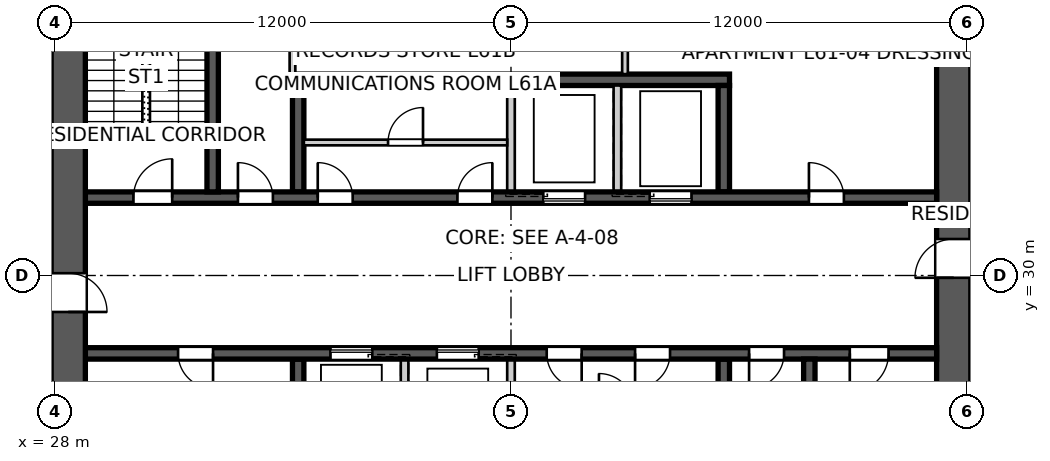
"""IFC4 building model, lengths in metres.
Left out: names, types, materials, properties, quantities, classifications, styles, units other than length and angle.
Written with IfcOpenShell. Run it as: python <this file> out.ifc"""

import sys

from ifc_helpers import new_model, si_unit, direction, frame, frame_2d, origin, place, context, subcontext, project, spatial, polyline, rectangle, outline, extrude, element, fill, save


model = new_model("IFC4")
c1 = context("Model", 3, precision=1e-05, world=origin(), true_north=direction((0.0, 1.0)))
c2 = subcontext(c1, "Body", "Model", "MODEL_VIEW")
j1 = project(units=[si_unit("LENGTHUNIT", "METRE"), si_unit("PLANEANGLEUNIT", "RADIAN")], contexts=[c1])
p1 = place(None, origin())
s1 = spatial("IfcSite", under=j1, at=p1, CompositionType="ELEMENT")
p2 = place(p1, origin())
s2 = spatial("IfcBuilding", under=s1, at=p2, CompositionType="ELEMENT")
p3 = place(p2, frame((0.0, 0.0, 221.8)))
s3 = spatial("IfcBuildingStorey", under=s2, at=p3, CompositionType="ELEMENT", Elevation=221.8)
p4 = place(p3, frame((51.65, 18.8, 0.0), z_axis=(0.0, 0.0, 1.0), x_axis=(0.0, 1.0, 0.0)))
e1 = element("IfcWall", 1, at=p4, inside=s3, PredefinedType="SHEAR", context=c2, shape_type="SweptSolid", body=[
    extrude(outline(polyline([(0.0, -0.45), (22.4, -0.45), (22.4, -0.025), (22.85, -0.025), (22.85, 0.025), (22.4, 0.025), (22.4, 0.45), (0.0, 0.45), (0.0, 0.025), (-0.45, 0.025), (-0.45, -0.025), (0.0, -0.025), (0.0, -0.45)])), origin(), (0.0, 0.0, 1.0), 3.4),
])
p5 = place(p4, frame((11.14, 0.0, 0.0)))
e2 = element("IfcOpeningElement", 2, at=p5, cuts=e1, PredefinedType="OPENING", context=c2, shape_type="SweptSolid", body=[
    extrude(rectangle(XDim=1.02, YDim=2.4, at=frame_2d((0.51, 1.2))), frame((0.0, 0.46, 0.0), z_axis=(0.0, -1.0, 0.0), x_axis=(1.0, 0.0, 0.0)), (0.0, 0.0, 1.0), 0.92),
])
p6 = place(p3, frame((28.35, 41.2, 0.0), z_axis=(0.0, 0.0, 1.0), x_axis=(0.0, -1.0, 0.0)))
e3 = element("IfcWall", 3, at=p6, inside=s3, PredefinedType="SHEAR", context=c2, shape_type="SweptSolid", body=[
    extrude(outline(polyline([(0.0, -0.45), (22.4, -0.45), (22.4, -0.025), (22.85, -0.025), (22.85, 0.025), (22.4, 0.025), (22.4, 0.45), (0.0, 0.45), (0.0, 0.025), (-0.45, 0.025), (-0.45, -0.025), (0.0, -0.025), (0.0, -0.45)])), origin(), (0.0, 0.0, 1.0), 3.4),
])
p7 = place(p6, frame((11.14, 0.0, 0.0)))
e4 = element("IfcOpeningElement", 4, at=p7, cuts=e3, PredefinedType="OPENING", context=c2, shape_type="SweptSolid", body=[
    extrude(rectangle(XDim=1.02, YDim=2.4, at=frame_2d((0.51, 1.2))), frame((0.0, 0.46, 0.0), z_axis=(0.0, -1.0, 0.0), x_axis=(1.0, 0.0, 0.0)), (0.0, 0.0, 1.0), 0.92),
])
p8 = place(p3, frame((28.8, 32.05, 0.0), z_axis=(0.0, 0.0, 1.0), x_axis=(1.0, 0.0, 0.0)))
e5 = element("IfcWall", 5, at=p8, inside=s3, PredefinedType="SHEAR", context=c2, shape_type="SweptSolid", body=[
    extrude(rectangle(XDim=22.4, YDim=0.3, at=frame_2d((11.2, 0.0))), origin(), (0.0, 0.0, 1.0), 3.4),
])
p9 = place(p8, frame((19.04, 0.0, 0.0)))
e6 = element("IfcOpeningElement", 6, at=p9, cuts=e5, PredefinedType="OPENING", context=c2, shape_type="SweptSolid", body=[
    extrude(rectangle(XDim=0.92, YDim=2.1, at=frame_2d((0.46, 1.05))), frame((0.0, 0.16, 0.0), z_axis=(0.0, -1.0, 0.0), x_axis=(1.0, 0.0, 0.0)), (0.0, 0.0, 1.0), 0.32),
])
p10 = place(p8, frame((1.265, 0.0, 0.0)))
e7 = element("IfcOpeningElement", 7, at=p10, cuts=e5, PredefinedType="OPENING", context=c2, shape_type="SweptSolid", body=[
    extrude(rectangle(XDim=1.02, YDim=2.1, at=frame_2d((0.51, 1.05))), frame((0.0, 0.16, 0.0), z_axis=(0.0, -1.0, 0.0), x_axis=(1.0, 0.0, 0.0)), (0.0, 0.0, 1.0), 0.32),
])
p11 = place(p8, frame((4.015, 0.0, 0.0)))
e8 = element("IfcOpeningElement", 8, at=p11, cuts=e5, PredefinedType="OPENING", context=c2, shape_type="SweptSolid", body=[
    extrude(rectangle(XDim=0.92, YDim=2.1, at=frame_2d((0.46, 1.05))), frame((0.0, 0.16, 0.0), z_axis=(0.0, -1.0, 0.0), x_axis=(1.0, 0.0, 0.0)), (0.0, 0.0, 1.0), 0.32),
])
p12 = place(p8, frame((6.115, 0.0, 0.0)))
e9 = element("IfcOpeningElement", 9, at=p12, cuts=e5, PredefinedType="OPENING", context=c2, shape_type="SweptSolid", body=[
    extrude(rectangle(XDim=0.92, YDim=2.1, at=frame_2d((0.46, 1.05))), frame((0.0, 0.16, 0.0), z_axis=(0.0, -1.0, 0.0), x_axis=(1.0, 0.0, 0.0)), (0.0, 0.0, 1.0), 0.32),
])
p13 = place(p8, frame((9.79, 0.0, 0.0)))
e10 = element("IfcOpeningElement", 10, at=p13, cuts=e5, PredefinedType="OPENING", context=c2, shape_type="SweptSolid", body=[
    extrude(rectangle(XDim=0.92, YDim=2.1, at=frame_2d((0.46, 1.05))), frame((0.0, 0.16, 0.0), z_axis=(0.0, -1.0, 0.0), x_axis=(1.0, 0.0, 0.0)), (0.0, 0.0, 1.0), 0.32),
])
p14 = place(p8, frame((12.05, 0.0, 0.0)))
e11 = element("IfcOpeningElement", 11, at=p14, cuts=e5, PredefinedType="OPENING", context=c2, shape_type="SweptSolid", body=[
    extrude(rectangle(XDim=1.1, YDim=2.1, at=frame_2d((0.55, 1.05))), frame((0.0, 0.16, 0.0), z_axis=(0.0, -1.0, 0.0), x_axis=(1.0, 0.0, 0.0)), (0.0, 0.0, 1.0), 0.32),
])
p15 = place(p8, frame((14.85, 0.0, 0.0)))
e12 = element("IfcOpeningElement", 12, at=p15, cuts=e5, PredefinedType="OPENING", context=c2, shape_type="SweptSolid", body=[
    extrude(rectangle(XDim=1.1, YDim=2.1, at=frame_2d((0.55, 1.05))), frame((0.0, 0.16, 0.0), z_axis=(0.0, -1.0, 0.0), x_axis=(1.0, 0.0, 0.0)), (0.0, 0.0, 1.0), 0.32),
])
p16 = place(p3, frame((51.2, 27.95, 0.0), z_axis=(0.0, 0.0, 1.0), x_axis=(-1.0, 0.0, 0.0)))
e13 = element("IfcWall", 13, at=p16, inside=s3, PredefinedType="SHEAR", context=c2, shape_type="SweptSolid", body=[
    extrude(rectangle(XDim=22.4, YDim=0.3, at=frame_2d((11.2, 0.0))), origin(), (0.0, 0.0, 1.0), 3.4),
])
p17 = place(p16, frame((19.04, 0.0, 0.0)))
e14 = element("IfcOpeningElement", 14, at=p17, cuts=e13, PredefinedType="OPENING", context=c2, shape_type="SweptSolid", body=[
    extrude(rectangle(XDim=0.92, YDim=2.1, at=frame_2d((0.46, 1.05))), frame((0.0, 0.16, 0.0), z_axis=(0.0, -1.0, 0.0), x_axis=(1.0, 0.0, 0.0)), (0.0, 0.0, 1.0), 0.32),
])
p18 = place(p16, frame((1.265, 0.0, 0.0)))
e15 = element("IfcOpeningElement", 15, at=p18, cuts=e13, PredefinedType="OPENING", context=c2, shape_type="SweptSolid", body=[
    extrude(rectangle(XDim=1.02, YDim=2.1, at=frame_2d((0.51, 1.05))), frame((0.0, 0.16, 0.0), z_axis=(0.0, -1.0, 0.0), x_axis=(1.0, 0.0, 0.0)), (0.0, 0.0, 1.0), 0.32),
])
p19 = place(p16, frame((4.015, 0.0, 0.0)))
e16 = element("IfcOpeningElement", 16, at=p19, cuts=e13, PredefinedType="OPENING", context=c2, shape_type="SweptSolid", body=[
    extrude(rectangle(XDim=0.92, YDim=2.1, at=frame_2d((0.46, 1.05))), frame((0.0, 0.16, 0.0), z_axis=(0.0, -1.0, 0.0), x_axis=(1.0, 0.0, 0.0)), (0.0, 0.0, 1.0), 0.32),
])
p20 = place(p16, frame((9.34, 0.0, 0.0)))
e17 = element("IfcOpeningElement", 17, at=p20, cuts=e13, PredefinedType="OPENING", context=c2, shape_type="SweptSolid", body=[
    extrude(rectangle(XDim=0.92, YDim=2.1, at=frame_2d((0.46, 1.05))), frame((0.0, 0.16, 0.0), z_axis=(0.0, -1.0, 0.0), x_axis=(1.0, 0.0, 0.0)), (0.0, 0.0, 1.0), 0.32),
])
p21 = place(p16, frame((7.015, 0.0, 0.0)))
e18 = element("IfcOpeningElement", 18, at=p21, cuts=e13, PredefinedType="OPENING", context=c2, shape_type="SweptSolid", body=[
    extrude(rectangle(XDim=0.92, YDim=2.1, at=frame_2d((0.46, 1.05))), frame((0.0, 0.16, 0.0), z_axis=(0.0, -1.0, 0.0), x_axis=(1.0, 0.0, 0.0)), (0.0, 0.0, 1.0), 0.32),
])
p22 = place(p16, frame((12.05, 0.0, 0.0)))
e19 = element("IfcOpeningElement", 19, at=p22, cuts=e13, PredefinedType="OPENING", context=c2, shape_type="SweptSolid", body=[
    extrude(rectangle(XDim=1.1, YDim=2.1, at=frame_2d((0.55, 1.05))), frame((0.0, 0.16, 0.0), z_axis=(0.0, -1.0, 0.0), x_axis=(1.0, 0.0, 0.0)), (0.0, 0.0, 1.0), 0.32),
])
p23 = place(p16, frame((14.85, 0.0, 0.0)))
e20 = element("IfcOpeningElement", 20, at=p23, cuts=e13, PredefinedType="OPENING", context=c2, shape_type="SweptSolid", body=[
    extrude(rectangle(XDim=1.1, YDim=2.1, at=frame_2d((0.55, 1.05))), frame((0.0, 0.16, 0.0), z_axis=(0.0, -1.0, 0.0), x_axis=(1.0, 0.0, 0.0)), (0.0, 0.0, 1.0), 0.32),
])
p24 = place(p3, frame((34.25, 35.15, 0.0), z_axis=(0.0, 0.0, 1.0), x_axis=(1.0, 0.0, 0.0)))
e21 = element("IfcWall", 21, at=p24, inside=s3, PredefinedType="SHEAR", context=c2, shape_type="SweptSolid", body=[
    extrude(rectangle(XDim=11.5, YDim=0.3, at=frame_2d((5.75, 0.0))), origin(), (0.0, 0.0, 1.0), 3.4),
])
for number, where, z_axis, x_axis in (
    (22, (34.4, 32.2, 0.0), (0.0, 0.0, 1.0), (0.0, 1.0, 0.0)),
    (23, (45.6, 27.8, 0.0), (0.0, 0.0, 1.0), (0.0, -1.0, 0.0)),
):
    element("IfcWall", number, at=place(p3, frame(where, z_axis=z_axis, x_axis=x_axis)), inside=s3, PredefinedType="SHEAR", context=c2, shape_type="SweptSolid", body=[
        extrude(rectangle(XDim=2.8, YDim=0.3, at=frame_2d((1.4, 0.0))), origin(), (0.0, 0.0, 1.0), 3.4),
    ])
for number, where, z_axis, x_axis in (
    (24, (40.0, 32.2, 0.0), (0.0, 0.0, 1.0), (0.0, 1.0, 0.0)),
    (25, (40.0, 27.8, 0.0), (0.0, 0.0, 1.0), (0.0, -1.0, 0.0)),
    (26, (42.8, 32.2, 0.0), (0.0, 0.0, 1.0), (0.0, 1.0, 0.0)),
    (27, (37.2, 27.8, 0.0), (0.0, 0.0, 1.0), (0.0, -1.0, 0.0)),
):
    element("IfcWall", number, at=place(p3, frame(where, z_axis=z_axis, x_axis=x_axis)), inside=s3, PredefinedType="SOLIDWALL", context=c2, shape_type="SweptSolid", body=[
        extrude(rectangle(XDim=2.8, YDim=0.2, at=frame_2d((1.4, 0.0))), origin(), (0.0, 0.0, 1.0), 3.4),
    ])
for number, where, z_axis, x_axis in (
    (28, (45.6, 32.2, 0.0), (0.0, 0.0, 1.0), (0.0, 1.0, 0.0)),
    (29, (34.4, 27.8, 0.0), (0.0, 0.0, 1.0), (0.0, -1.0, 0.0)),
):
    element("IfcWall", number, at=place(p3, frame(where, z_axis=z_axis, x_axis=x_axis)), inside=s3, PredefinedType="SHEAR", context=c2, shape_type="SweptSolid", body=[
        extrude(rectangle(XDim=2.8, YDim=0.3, at=frame_2d((1.4, 0.0))), origin(), (0.0, 0.0, 1.0), 3.4),
    ])
for number, where, z_axis, x_axis in (
    (30, (32.15, 32.2, 0.0), (0.0, 0.0, 1.0), (0.0, 1.0, 0.0)),
    (31, (47.85, 27.8, 0.0), (0.0, 0.0, 1.0), (0.0, -1.0, 0.0)),
):
    element("IfcWall", number, at=place(p3, frame(where, z_axis=z_axis, x_axis=x_axis)), inside=s3, PredefinedType="SHEAR", context=c2, shape_type="SweptSolid", body=[
        extrude(rectangle(XDim=7.7, YDim=0.3, at=frame_2d((3.85, 0.0))), origin(), (0.0, 0.0, 1.0), 3.4),
    ])
p25 = place(p3, frame((34.25, 41.2, 0.0), z_axis=(0.0, 0.0, 1.0), x_axis=(0.0, -1.0, 0.0)))
e32 = element("IfcWall", 32, at=p25, inside=s3, PredefinedType="SOLIDWALL", context=c2, shape_type="SweptSolid", body=[
    extrude(rectangle(XDim=5.95, YDim=0.15, at=frame_2d((2.975, 0.0))), origin(), (0.0, 0.0, 1.0), 3.25),
])
p26 = place(p25, frame((2.515, 0.0, 0.0)))
e33 = element("IfcOpeningElement", 33, at=p26, cuts=e32, PredefinedType="OPENING", context=c2, shape_type="SweptSolid", body=[
    extrude(rectangle(XDim=0.92, YDim=2.1, at=frame_2d((0.46, 1.05))), frame((0.0, 0.085, 0.0), z_axis=(0.0, -1.0, 0.0), x_axis=(1.0, 0.0, 0.0)), (0.0, 0.0, 1.0), 0.17),
])
p27 = place(p3, frame((43.0, 41.2, 0.0), z_axis=(0.0, 0.0, 1.0), x_axis=(0.0, -1.0, 0.0)))
e34 = element("IfcWall", 34, at=p27, inside=s3, PredefinedType="SOLIDWALL", context=c2, shape_type="SweptSolid", body=[
    extrude(rectangle(XDim=5.9, YDim=0.15, at=frame_2d((2.95, 0.0))), origin(), (0.0, 0.0, 1.0), 3.25),
])
p28 = place(p3, frame((34.55, 33.5, 0.0), z_axis=(0.0, 0.0, 1.0), x_axis=(1.0, 0.0, 0.0)))
e35 = element("IfcWall", 35, at=p28, inside=s3, PredefinedType="SOLIDWALL", context=c2, shape_type="SweptSolid", body=[
    extrude(rectangle(XDim=5.35, YDim=0.15, at=frame_2d((2.675, 0.0))), origin(), (0.0, 0.0, 1.0), 3.25),
])
p29 = place(p28, frame((2.215, 0.0, 0.0)))
e36 = element("IfcOpeningElement", 36, at=p29, cuts=e35, PredefinedType="OPENING", context=c2, shape_type="SweptSolid", body=[
    extrude(rectangle(XDim=0.92, YDim=2.1, at=frame_2d((0.46, 1.05))), frame((0.0, 0.085, 0.0), z_axis=(0.0, -1.0, 0.0), x_axis=(1.0, 0.0, 0.0)), (0.0, 0.0, 1.0), 0.17),
])
p30 = place(p9, origin())
e37 = element("IfcDoor", 37, at=p30, inside=s3, OperationType="SINGLE_SWING_LEFT", PredefinedType="DOOR", context=c2, shape_type="SweptSolid", body=[
    extrude(rectangle(XDim=0.92, YDim=2.1, at=frame_2d((0.46, 1.05))), frame((0.0, 0.025, 0.0), z_axis=(0.0, -1.0, 0.0), x_axis=(1.0, 0.0, 0.0)), (0.0, 0.0, 1.0), 0.05),
])
fill(e6, e37)
p31 = place(p17, origin())
e38 = element("IfcDoor", 38, at=p31, inside=s3, OperationType="SINGLE_SWING_LEFT", PredefinedType="DOOR", context=c2, shape_type="SweptSolid", body=[
    extrude(rectangle(XDim=0.92, YDim=2.1, at=frame_2d((0.46, 1.05))), frame((0.0, 0.025, 0.0), z_axis=(0.0, -1.0, 0.0), x_axis=(1.0, 0.0, 0.0)), (0.0, 0.0, 1.0), 0.05),
])
fill(e14, e38)
p32 = place(p18, origin())
e39 = element("IfcDoor", 39, at=p32, inside=s3, OperationType="SINGLE_SWING_RIGHT", PredefinedType="DOOR", context=c2, shape_type="SweptSolid", body=[
    extrude(rectangle(XDim=1.02, YDim=2.1, at=frame_2d((0.51, 1.05))), frame((0.0, 0.025, 0.0), z_axis=(0.0, -1.0, 0.0), x_axis=(1.0, 0.0, 0.0)), (0.0, 0.0, 1.0), 0.05),
])
fill(e15, e39)
p33 = place(p10, origin())
e40 = element("IfcDoor", 40, at=p33, inside=s3, OperationType="SINGLE_SWING_RIGHT", PredefinedType="DOOR", context=c2, shape_type="SweptSolid", body=[
    extrude(rectangle(XDim=1.02, YDim=2.1, at=frame_2d((0.51, 1.05))), frame((0.0, 0.025, 0.0), z_axis=(0.0, -1.0, 0.0), x_axis=(1.0, 0.0, 0.0)), (0.0, 0.0, 1.0), 0.05),
])
fill(e7, e40)
p34 = place(p11, origin())
e41 = element("IfcDoor", 41, at=p34, inside=s3, OperationType="SINGLE_SWING_LEFT", PredefinedType="DOOR", context=c2, shape_type="SweptSolid", body=[
    extrude(rectangle(XDim=0.92, YDim=2.1, at=frame_2d((0.46, 1.05))), frame((0.0, 0.025, 0.0), z_axis=(0.0, -1.0, 0.0), x_axis=(1.0, 0.0, 0.0)), (0.0, 0.0, 1.0), 0.05),
])
fill(e8, e41)
p35 = place(p19, origin())
e42 = element("IfcDoor", 42, at=p35, inside=s3, OperationType="SINGLE_SWING_RIGHT", PredefinedType="DOOR", context=c2, shape_type="SweptSolid", body=[
    extrude(rectangle(XDim=0.92, YDim=2.1, at=frame_2d((0.46, 1.05))), frame((0.0, 0.025, 0.0), z_axis=(0.0, -1.0, 0.0), x_axis=(1.0, 0.0, 0.0)), (0.0, 0.0, 1.0), 0.05),
])
fill(e16, e42)
p36 = place(p12, origin())
e43 = element("IfcDoor", 43, at=p36, inside=s3, OperationType="SINGLE_SWING_LEFT", PredefinedType="DOOR", context=c2, shape_type="SweptSolid", body=[
    extrude(rectangle(XDim=0.92, YDim=2.1, at=frame_2d((0.46, 1.05))), frame((0.0, 0.025, 0.0), z_axis=(0.0, -1.0, 0.0), x_axis=(1.0, 0.0, 0.0)), (0.0, 0.0, 1.0), 0.05),
])
fill(e9, e43)
p37 = place(p13, origin())
e44 = element("IfcDoor", 44, at=p37, inside=s3, OperationType="SINGLE_SWING_RIGHT", PredefinedType="DOOR", context=c2, shape_type="SweptSolid", body=[
    extrude(rectangle(XDim=0.92, YDim=2.1, at=frame_2d((0.46, 1.05))), frame((0.0, 0.025, 0.0), z_axis=(0.0, -1.0, 0.0), x_axis=(1.0, 0.0, 0.0)), (0.0, 0.0, 1.0), 0.05),
])
fill(e10, e44)
p38 = place(p29, origin())
e45 = element("IfcDoor", 45, at=p38, inside=s3, OperationType="SINGLE_SWING_RIGHT", PredefinedType="DOOR", context=c2, shape_type="SweptSolid", body=[
    extrude(rectangle(XDim=0.92, YDim=2.1, at=frame_2d((0.46, 1.05))), frame((0.0, 0.025, 0.0), z_axis=(0.0, -1.0, 0.0), x_axis=(1.0, 0.0, 0.0)), (0.0, 0.0, 1.0), 0.05),
])
fill(e36, e45)
p39 = place(p20, origin())
e46 = element("IfcDoor", 46, at=p39, inside=s3, OperationType="SINGLE_SWING_LEFT", PredefinedType="DOOR", context=c2, shape_type="SweptSolid", body=[
    extrude(rectangle(XDim=0.92, YDim=2.1, at=frame_2d((0.46, 1.05))), frame((0.0, 0.025, 0.0), z_axis=(0.0, -1.0, 0.0), x_axis=(1.0, 0.0, 0.0)), (0.0, 0.0, 1.0), 0.05),
])
fill(e17, e46)
p40 = place(p21, origin())
e47 = element("IfcDoor", 47, at=p40, inside=s3, OperationType="SINGLE_SWING_RIGHT", PredefinedType="DOOR", context=c2, shape_type="SweptSolid", body=[
    extrude(rectangle(XDim=0.92, YDim=2.1, at=frame_2d((0.46, 1.05))), frame((0.0, 0.025, 0.0), z_axis=(0.0, -1.0, 0.0), x_axis=(1.0, 0.0, 0.0)), (0.0, 0.0, 1.0), 0.05),
])
fill(e18, e47)
p41 = place(p5, origin())
e48 = element("IfcDoor", 48, at=p41, inside=s3, OperationType="SINGLE_SWING_LEFT", PredefinedType="DOOR", context=c2, shape_type="SweptSolid", body=[
    extrude(rectangle(XDim=1.02, YDim=2.4, at=frame_2d((0.51, 1.2))), frame((0.0, 0.025, 0.0), z_axis=(0.0, -1.0, 0.0), x_axis=(1.0, 0.0, 0.0)), (0.0, 0.0, 1.0), 0.05),
])
fill(e2, e48)
p42 = place(p7, origin())
e49 = element("IfcDoor", 49, at=p42, inside=s3, OperationType="SINGLE_SWING_RIGHT", PredefinedType="DOOR", context=c2, shape_type="SweptSolid", body=[
    extrude(rectangle(XDim=1.02, YDim=2.4, at=frame_2d((0.51, 1.2))), frame((0.0, 0.025, 0.0), z_axis=(0.0, -1.0, 0.0), x_axis=(1.0, 0.0, 0.0)), (0.0, 0.0, 1.0), 0.05),
])
fill(e4, e49)
p43 = place(p14, origin())
e50 = element("IfcDoor", 50, at=p43, inside=s3, OperationType="SLIDING_TO_LEFT", PredefinedType="DOOR", context=c2, shape_type="SweptSolid", body=[
    extrude(rectangle(XDim=1.1, YDim=2.1, at=frame_2d((0.55, 1.05))), frame((0.0, 0.025, 0.0), z_axis=(0.0, -1.0, 0.0), x_axis=(1.0, 0.0, 0.0)), (0.0, 0.0, 1.0), 0.05),
])
fill(e11, e50)
p44 = place(p22, origin())
e51 = element("IfcDoor", 51, at=p44, inside=s3, OperationType="SLIDING_TO_LEFT", PredefinedType="DOOR", context=c2, shape_type="SweptSolid", body=[
    extrude(rectangle(XDim=1.1, YDim=2.1, at=frame_2d((0.55, 1.05))), frame((0.0, 0.025, 0.0), z_axis=(0.0, -1.0, 0.0), x_axis=(1.0, 0.0, 0.0)), (0.0, 0.0, 1.0), 0.05),
])
fill(e19, e51)
p45 = place(p15, origin())
e52 = element("IfcDoor", 52, at=p45, inside=s3, OperationType="SLIDING_TO_LEFT", PredefinedType="DOOR", context=c2, shape_type="SweptSolid", body=[
    extrude(rectangle(XDim=1.1, YDim=2.1, at=frame_2d((0.55, 1.05))), frame((0.0, 0.025, 0.0), z_axis=(0.0, -1.0, 0.0), x_axis=(1.0, 0.0, 0.0)), (0.0, 0.0, 1.0), 0.05),
])
fill(e12, e52)
p46 = place(p23, origin())
e53 = element("IfcDoor", 53, at=p46, inside=s3, OperationType="SLIDING_TO_LEFT", PredefinedType="DOOR", context=c2, shape_type="SweptSolid", body=[
    extrude(rectangle(XDim=1.1, YDim=2.1, at=frame_2d((0.55, 1.05))), frame((0.0, 0.025, 0.0), z_axis=(0.0, -1.0, 0.0), x_axis=(1.0, 0.0, 0.0)), (0.0, 0.0, 1.0), 0.05),
])
fill(e20, e53)
save(model, sys.argv[1])
